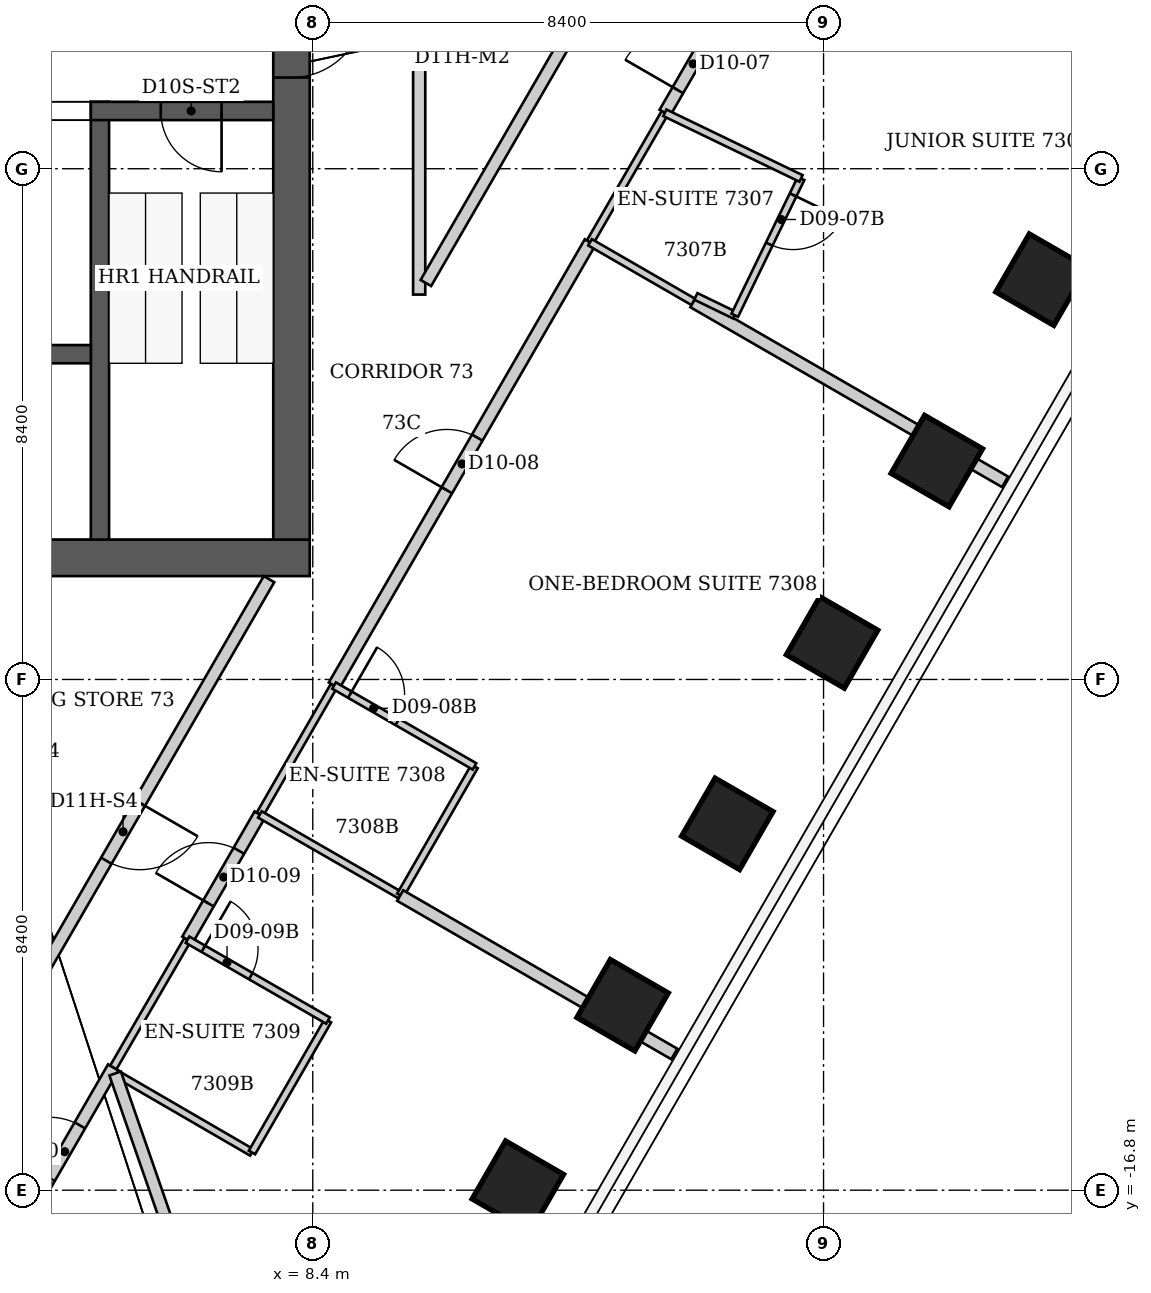
"""IFC4 building model, lengths in metres.
Left out: names, types, materials, properties, quantities, classifications, styles, units other than length and angle.
Written with IfcOpenShell. Run it as: python <this file> out.ifc"""

import sys

from ifc_helpers import new_model, si_unit, direction, frame, frame_2d, origin, origin_2d, place, context, subcontext, project, spatial, rectangle, extrude, element, fill, save


model = new_model("IFC4")
c1 = context("Model", 3, precision=1e-05, world=origin(), true_north=direction((0.0, 1.0)))
c2 = subcontext(c1, "Body", "Model", "MODEL_VIEW")
j1 = project(units=[si_unit("LENGTHUNIT", "METRE"), si_unit("PLANEANGLEUNIT", "RADIAN")], contexts=[c1])
p1 = place(None, origin())
s1 = spatial("IfcSite", under=j1, at=p1, CompositionType="ELEMENT")
p2 = place(p1, origin())
s2 = spatial("IfcBuilding", under=s1, at=p2, CompositionType="ELEMENT")
p3 = place(p2, frame((0.0, 0.0, 291.2)))
s3 = spatial("IfcBuildingStorey", under=s2, at=p3, CompositionType="ELEMENT", Elevation=291.2)
for number, where, z_axis, x_axis in (
    (1, (20.385, -1.824, 0.0), (0.0, 0.0, 1.0), (0.866, -0.5, 0.0)),
    (2, (18.663, -4.808, 0.0), (0.0, 0.0, 1.0), (0.866, -0.5, 0.0)),
    (3, (16.94, -7.792, 0.0), (0.0, 0.0, 1.0), (0.866, -0.5, 0.0)),
    (4, (15.218, -10.775, 0.0), (0.0, 0.0, 1.0), (0.866, -0.5, 0.0)),
    (5, (13.495, -13.759, 0.0), (0.0, 0.0, 1.0), (0.866, -0.5, 0.0)),
    (6, (11.773, -16.742, 0.0), (0.0, 0.0, 1.0), (0.866, -0.5, 0.0)),
):
    element("IfcColumn", number, at=place(p3, frame(where, z_axis=z_axis, x_axis=x_axis)), inside=s3, PredefinedType="COLUMN", context=c2, shape_type="SweptSolid", body=[
        extrude(rectangle(XDim=1.1, YDim=1.1, at=origin_2d()), origin(), (0.0, 0.0, 1.0), 3.8),
    ])
p4 = place(p3, frame((-8.35, -6.4, 0.0), z_axis=(0.0, 0.0, 1.0), x_axis=(1.0, 0.0, 0.0)))
e7 = element("IfcWall", 7, at=p4, inside=s3, PredefinedType="SHEAR", context=c2, shape_type="SweptSolid", body=[
    extrude(rectangle(XDim=16.7, YDim=0.6, at=frame_2d((8.35, 0.0))), origin(), (0.0, 0.0, 1.0), 3.8),
])
p5 = place(p3, frame((8.05, -6.1, 0.0), z_axis=(0.0, 0.0, 1.0), x_axis=(0.0, 1.0, 0.0)))
e8 = element("IfcWall", 8, at=p5, inside=s3, PredefinedType="SHEAR", context=c2, shape_type="SweptSolid", body=[
    extrude(rectangle(XDim=12.2, YDim=0.6, at=frame_2d((6.1, 0.0))), origin(), (0.0, 0.0, 1.0), 3.8),
])
p6 = place(p5, frame((7.6, 0.0, 0.0)))
e9 = element("IfcOpeningElement", 9, at=p6, cuts=e8, PredefinedType="OPENING", context=c2, shape_type="SweptSolid", body=[
    extrude(rectangle(XDim=1.2, YDim=2.2, at=frame_2d((0.6, 1.1))), frame((0.0, 0.3, 0.0), z_axis=(0.0, -1.0, 0.0), x_axis=(1.0, 0.0, 0.0)), (0.0, 0.0, 1.0), 0.6),
])
p7 = place(p3, frame((4.9, -6.1, 0.0), z_axis=(0.0, 0.0, 1.0), x_axis=(0.0, 1.0, 0.0)))
e10 = element("IfcWall", 10, at=p7, inside=s3, PredefinedType="SHEAR", context=c2, shape_type="SweptSolid", body=[
    extrude(rectangle(XDim=7.2, YDim=0.3, at=frame_2d((3.6, 0.0))), origin(), (0.0, 0.0, 1.0), 3.8),
])
p8 = place(p3, frame((4.75, 0.95, 0.0), z_axis=(0.0, 0.0, 1.0), x_axis=(1.0, 0.0, 0.0)))
e11 = element("IfcWall", 11, at=p8, inside=s3, PredefinedType="SHEAR", context=c2, shape_type="SweptSolid", body=[
    extrude(rectangle(XDim=3.0, YDim=0.3, at=frame_2d((1.5, 0.0))), origin(), (0.0, 0.0, 1.0), 3.8),
])
p9 = place(p8, frame((1.15, 0.0, 0.0)))
e12 = element("IfcOpeningElement", 12, at=p9, cuts=e11, PredefinedType="OPENING", context=c2, shape_type="SweptSolid", body=[
    extrude(rectangle(XDim=1.0, YDim=2.2, at=frame_2d((0.5, 1.1))), frame((0.0, 0.15, 0.0), z_axis=(0.0, -1.0, 0.0), x_axis=(1.0, 0.0, 0.0)), (0.0, 0.0, 1.0), 0.3),
])
p10 = place(p3, frame((1.65, -3.05, 0.0), z_axis=(0.0, 0.0, 1.0), x_axis=(1.0, 0.0, 0.0)))
e13 = element("IfcWall", 13, at=p10, inside=s3, PredefinedType="SHEAR", context=c2, shape_type="SweptSolid", body=[
    extrude(rectangle(XDim=3.1, YDim=0.3, at=frame_2d((1.55, 0.0))), origin(), (0.0, 0.0, 1.0), 3.8),
])
p11 = place(p10, frame((0.9, 0.0, 0.0)))
e14 = element("IfcOpeningElement", 14, at=p11, cuts=e13, PredefinedType="OPENING", context=c2, shape_type="SweptSolid", body=[
    extrude(rectangle(XDim=1.3, YDim=2.1, at=frame_2d((0.65, 1.05))), frame((0.0, 0.15, 0.0), z_axis=(0.0, -1.0, 0.0), x_axis=(1.0, 0.0, 0.0)), (0.0, 0.0, 1.0), 0.3),
])
p12 = place(p3, frame((3.92, -16.86, 0.0), z_axis=(0.0, 0.0, 1.0), x_axis=(0.499693115345, 0.866202511239, 0.0)))
e15 = element("IfcWall", 15, at=p12, inside=s3, PredefinedType="PARTITIONING", context=c2, shape_type="SweptSolid", body=[
    extrude(rectangle(XDim=2.401, YDim=0.2, at=frame_2d((1.201, 0.0))), origin(), (0.0, 0.0, 1.0), 3.64),
])
p13 = place(p12, frame((0.3, 0.0, 0.0)))
e16 = element("IfcOpeningElement", 16, at=p13, cuts=e15, PredefinedType="OPENING", context=c2, shape_type="SweptSolid", body=[
    extrude(rectangle(XDim=1.0, YDim=2.13, at=frame_2d((0.5, 1.065))), frame((0.0, 0.1, 0.0), z_axis=(0.0, -1.0, 0.0), x_axis=(1.0, 0.0, 0.0)), (0.0, 0.0, 1.0), 0.2),
])
p14 = place(p3, frame((5.12, -14.78, 0.0), z_axis=(0.0, 0.0, 1.0), x_axis=(0.502307685327, 0.86468895521, 0.0)))
e17 = element("IfcWall", 17, at=p14, inside=s3, PredefinedType="PARTITIONING", context=c2, shape_type="SweptSolid", body=[
    extrude(rectangle(XDim=2.429, YDim=0.12, at=frame_2d((1.214, 0.0))), origin(), (0.0, 0.0, 1.0), 3.64),
])
p15 = place(p3, frame((5.233, -14.923, 0.0), z_axis=(0.0, 0.0, 1.0), x_axis=(0.864900876675, -0.501942699445, 0.0)))
e18 = element("IfcWall", 18, at=p15, inside=s3, PredefinedType="PARTITIONING", context=c2, shape_type="SweptSolid", body=[
    extrude(rectangle(XDim=2.505, YDim=0.12, at=frame_2d((1.252, 0.0))), origin(), (0.0, 0.0, 1.0), 3.038),
])
p16 = place(p3, frame((6.34, -12.68, 0.0), z_axis=(0.0, 0.0, 1.0), x_axis=(0.500222880675, 0.865896685321, 0.0)))
e19 = element("IfcWall", 19, at=p16, inside=s3, PredefinedType="PARTITIONING", context=c2, shape_type="SweptSolid", body=[
    extrude(rectangle(XDim=2.379, YDim=0.2, at=frame_2d((1.189, 0.0))), origin(), (0.0, 0.0, 1.0), 3.64),
])
p17 = place(p16, frame((0.689, 0.0, 0.0)))
e20 = element("IfcOpeningElement", 20, at=p17, cuts=e19, PredefinedType="OPENING", context=c2, shape_type="SweptSolid", body=[
    extrude(rectangle(XDim=1.0, YDim=2.13, at=frame_2d((0.5, 1.065))), frame((0.0, 0.1, 0.0), z_axis=(0.0, -1.0, 0.0), x_axis=(1.0, 0.0, 0.0)), (0.0, 0.0, 1.0), 0.2),
])
p18 = place(p3, frame((7.4, -16.18, 0.0), z_axis=(0.0, 0.0, 1.0), x_axis=(0.499159685399, 0.866510016372, 0.0)))
e21 = element("IfcWall", 21, at=p18, inside=s3, PredefinedType="PARTITIONING", context=c2, shape_type="SweptSolid", body=[
    extrude(rectangle(XDim=2.504, YDim=0.12, at=frame_2d((1.252, 0.0))), origin(), (0.0, 0.0, 1.0), 3.64),
])
p19 = place(p3, frame((7.53, -10.62, 0.0), z_axis=(0.0, 0.0, 1.0), x_axis=(0.498748634132, 0.866746675766, 0.0)))
e22 = element("IfcWall", 22, at=p19, inside=s3, PredefinedType="PARTITIONING", context=c2, shape_type="SweptSolid", body=[
    extrude(rectangle(XDim=2.446, YDim=0.12, at=frame_2d((1.223, 0.0))), origin(), (0.0, 0.0, 1.0), 3.64),
])
p20 = place(p3, frame((7.53, -10.62, 0.0), z_axis=(0.0, 0.0, 1.0), x_axis=(0.866654860089, -0.498908161372, 0.0)))
e23 = element("IfcWall", 23, at=p20, inside=s3, PredefinedType="PARTITIONING", context=c2, shape_type="SweptSolid", body=[
    extrude(rectangle(XDim=2.666, YDim=0.12, at=frame_2d((1.333, 0.0))), origin(), (0.0, 0.0, 1.0), 3.64),
])
p21 = place(p3, frame((7.68, -6.75, 0.0), z_axis=(0.0, 0.0, 1.0), x_axis=(-0.500174600737, -0.865924574532, 0.0)))
e24 = element("IfcWall", 24, at=p21, inside=s3, PredefinedType="PARTITIONING", context=c2, shape_type="SweptSolid", body=[
    extrude(rectangle(XDim=9.597, YDim=0.2, at=frame_2d((4.798, 0.0))), origin(), (0.0, 0.0, 1.0), 3.64),
])
p22 = place(p21, frame((4.248, 0.0, 0.0)))
e25 = element("IfcOpeningElement", 25, at=p22, cuts=e24, PredefinedType="OPENING", context=c2, shape_type="SweptSolid", body=[
    extrude(rectangle(XDim=1.1, YDim=2.2, at=frame_2d((0.55, 1.1))), frame((0.0, 0.1, 0.0), z_axis=(0.0, -1.0, 0.0), x_axis=(1.0, 0.0, 0.0)), (0.0, 0.0, 1.0), 0.2),
])
p23 = place(p3, frame((8.45, -24.382, 0.0), z_axis=(0.0, 0.0, 1.0), x_axis=(-0.328108256954, 0.944640128154, 0.0)))
e26 = element("IfcWall", 26, at=p23, inside=s3, PredefinedType="PARTITIONING", context=c2, shape_type="SweptSolid", body=[
    extrude(rectangle(XDim=10.059, YDim=0.2, at=frame_2d((5.029, 0.0))), origin(), (0.0, 0.0, 1.0), 3.64),
])
p24 = place(p3, frame((8.65, -14.01, 0.0), z_axis=(0.0, 0.0, 1.0), x_axis=(-0.866592449628, 0.499016559092, 0.0)))
e27 = element("IfcWall", 27, at=p24, inside=s3, PredefinedType="PARTITIONING", context=c2, shape_type="SweptSolid", body=[
    extrude(rectangle(XDim=2.665, YDim=0.12, at=frame_2d((1.333, 0.0))), origin(), (0.0, 0.0, 1.0), 3.64),
])
p25 = place(p24, frame((1.466, 0.0, 0.0)))
e28 = element("IfcOpeningElement", 28, at=p25, cuts=e27, PredefinedType="OPENING", context=c2, shape_type="SweptSolid", body=[
    extrude(rectangle(XDim=0.9, YDim=2.03, at=frame_2d((0.45, 1.015))), frame((0.0, 0.06, 0.0), z_axis=(0.0, -1.0, 0.0), x_axis=(1.0, 0.0, 0.0)), (0.0, 0.0, 1.0), 0.12),
])
p26 = place(p3, frame((8.75, -8.5, 0.0), z_axis=(0.0, 0.0, 1.0), x_axis=(0.500093981358, 0.865971136822, 0.0)))
e29 = element("IfcWall", 29, at=p26, inside=s3, PredefinedType="PARTITIONING", context=c2, shape_type="SweptSolid", body=[
    extrude(rectangle(XDim=8.418, YDim=0.2, at=frame_2d((4.209, 0.0))), origin(), (0.0, 0.0, 1.0), 3.64),
])
p27 = place(p26, frame((3.709, 0.0, 0.0)))
e30 = element("IfcOpeningElement", 30, at=p27, cuts=e29, PredefinedType="OPENING", context=c2, shape_type="SweptSolid", body=[
    extrude(rectangle(XDim=1.0, YDim=2.13, at=frame_2d((0.5, 1.065))), frame((0.0, 0.1, 0.0), z_axis=(0.0, -1.0, 0.0), x_axis=(1.0, 0.0, 0.0)), (0.0, 0.0, 1.0), 0.2),
])
p28 = place(p3, frame((9.84, -11.95, 0.0), z_axis=(0.0, 0.0, 1.0), x_axis=(0.498791783817, 0.866721844883, 0.0)))
e31 = element("IfcWall", 31, at=p28, inside=s3, PredefinedType="PARTITIONING", context=c2, shape_type="SweptSolid", body=[
    extrude(rectangle(XDim=2.446, YDim=0.12, at=frame_2d((1.223, 0.0))), origin(), (0.0, 0.0, 1.0), 3.64),
])
p29 = place(p3, frame((10.15, -2.07, 0.0), z_axis=(0.0, 0.0, 1.0), x_axis=(0.0, 1.0, 0.0)))
e32 = element("IfcWall", 32, at=p29, inside=s3, PredefinedType="PARTITIONING", context=c2, shape_type="SweptSolid", body=[
    extrude(rectangle(XDim=9.21, YDim=0.2, at=frame_2d((4.605, 0.0))), origin(), (0.0, 0.0, 1.0), 3.64),
])
p30 = place(p29, frame((4.055, 0.0, 0.0)))
e33 = element("IfcOpeningElement", 33, at=p30, cuts=e32, PredefinedType="OPENING", context=c2, shape_type="SweptSolid", body=[
    extrude(rectangle(XDim=1.1, YDim=2.2, at=frame_2d((0.55, 1.1))), frame((0.0, 0.1, 0.0), z_axis=(0.0, -1.0, 0.0), x_axis=(1.0, 0.0, 0.0)), (0.0, 0.0, 1.0), 0.2),
])
p31 = place(p3, frame((11.06, -9.83, 0.0), z_axis=(0.0, 0.0, 1.0), x_axis=(-0.866615255992, 0.498976951453, 0.0)))
e34 = element("IfcWall", 34, at=p31, inside=s3, PredefinedType="PARTITIONING", context=c2, shape_type="SweptSolid", body=[
    extrude(rectangle(XDim=2.666, YDim=0.12, at=frame_2d((1.333, 0.0))), origin(), (0.0, 0.0, 1.0), 3.64),
])
p32 = place(p31, frame((1.466, 0.0, 0.0)))
e35 = element("IfcOpeningElement", 35, at=p32, cuts=e34, PredefinedType="OPENING", context=c2, shape_type="SweptSolid", body=[
    extrude(rectangle(XDim=0.9, YDim=2.03, at=frame_2d((0.45, 1.015))), frame((0.0, 0.06, 0.0), z_axis=(0.0, -1.0, 0.0), x_axis=(1.0, 0.0, 0.0)), (0.0, 0.0, 1.0), 0.12),
])
p33 = place(p3, frame((12.81, 2.53, 0.0), z_axis=(0.0, 0.0, 1.0), x_axis=(-0.500571425319, -0.865695239766, 0.0)))
e36 = element("IfcWall", 36, at=p33, inside=s3, PredefinedType="PARTITIONING", context=c2, shape_type="SweptSolid", body=[
    extrude(rectangle(XDim=5.094, YDim=0.2, at=frame_2d((2.547, 0.0))), origin(), (0.0, 0.0, 1.0), 3.64),
])
p34 = place(p3, frame((12.959, -1.209, 0.0), z_axis=(0.0, 0.0, 1.0), x_axis=(0.500472725713, 0.865752303385, 0.0)))
e37 = element("IfcWall", 37, at=p34, inside=s3, PredefinedType="PARTITIONING", context=c2, shape_type="SweptSolid", body=[
    extrude(rectangle(XDim=2.459, YDim=0.12, at=frame_2d((1.23, 0.0))), origin(), (0.0, 0.0, 1.0), 3.64),
])
p35 = place(p3, frame((12.96, -1.21, 0.0), z_axis=(0.0, 0.0, 1.0), x_axis=(0.866075784294, -0.499912728242, 0.0)))
e38 = element("IfcWall", 38, at=p35, inside=s3, PredefinedType="PARTITIONING", context=c2, shape_type="SweptSolid", body=[
    extrude(rectangle(XDim=1.962, YDim=0.12, at=frame_2d((0.981, 0.0))), origin(), (0.0, 0.0, 1.0), 3.64),
])
p36 = place(p3, frame((14.19, 0.92, 0.0), z_axis=(0.0, 0.0, 1.0), x_axis=(0.500233848448, 0.865890349217, 0.0)))
e39 = element("IfcWall", 39, at=p36, inside=s3, PredefinedType="PARTITIONING", context=c2, shape_type="SweptSolid", body=[
    extrude(rectangle(XDim=1.859, YDim=0.2, at=frame_2d((0.93, 0.0))), origin(), (0.0, 0.0, 1.0), 3.64),
])
p37 = place(p36, frame((0.43, 0.0, 0.0)))
e40 = element("IfcOpeningElement", 40, at=p37, cuts=e39, PredefinedType="OPENING", context=c2, shape_type="SweptSolid", body=[
    extrude(rectangle(XDim=1.0, YDim=2.13, at=frame_2d((0.5, 1.065))), frame((0.0, 0.1, 0.0), z_axis=(0.0, -1.0, 0.0), x_axis=(1.0, 0.0, 0.0)), (0.0, 0.0, 1.0), 0.2),
])
p38 = place(p3, frame((14.346, -14.56, 0.0), z_axis=(0.0, 0.0, 1.0), x_axis=(-0.86575990496, 0.500459575754, 0.0)))
e41 = element("IfcWall", 41, at=p38, inside=s3, PredefinedType="PARTITIONING", context=c2, shape_type="SweptSolid", body=[
    extrude(rectangle(XDim=5.208, YDim=0.2, at=frame_2d((2.604, 0.0))), origin(), (0.0, 0.0, 1.0), 3.64),
])
p39 = place(p3, frame((14.659, -2.191, 0.0), z_axis=(0.0, 0.0, 1.0), x_axis=(0.866075017274, -0.499914057068, 0.0)))
e42 = element("IfcWall", 42, at=p39, inside=s3, PredefinedType="PARTITIONING", context=c2, shape_type="SweptSolid", body=[
    extrude(rectangle(XDim=5.919, YDim=0.2, at=frame_2d((2.96, 0.0))), origin(), (0.0, 0.0, 1.0), 3.64),
])
p40 = place(p3, frame((14.7, -2.1, 0.0), z_axis=(0.0, 0.0, 1.0), x_axis=(0.900120171182, -0.43564168468, 0.0)))
e43 = element("IfcWall", 43, at=p40, inside=s3, PredefinedType="PARTITIONING", context=c2, shape_type="SweptSolid", body=[
    extrude(rectangle(XDim=0.711, YDim=0.12, at=frame_2d((0.355, 0.0))), origin(), (0.0, 0.0, 1.0), 3.64),
])
p41 = place(p3, frame((15.34, -2.41, 0.0), z_axis=(0.0, 0.0, 1.0), x_axis=(0.435928453727, 0.899981323824, 0.0)))
e44 = element("IfcWall", 44, at=p41, inside=s3, PredefinedType="PARTITIONING", context=c2, shape_type="SweptSolid", body=[
    extrude(rectangle(XDim=2.5, YDim=0.12, at=frame_2d((1.25, 0.0))), origin(), (0.0, 0.0, 1.0), 3.64),
])
p42 = place(p41, frame((1.3, 0.0, 0.0)))
e45 = element("IfcOpeningElement", 45, at=p42, cuts=e44, PredefinedType="OPENING", context=c2, shape_type="SweptSolid", body=[
    extrude(rectangle(XDim=0.9, YDim=2.03, at=frame_2d((0.45, 1.015))), frame((0.0, 0.06, 0.0), z_axis=(0.0, -1.0, 0.0), x_axis=(1.0, 0.0, 0.0)), (0.0, 0.0, 1.0), 0.12),
])
p43 = place(p3, frame((16.43, -0.16, 0.0), z_axis=(0.0, 0.0, 1.0), x_axis=(-0.900794056548, 0.434246551729, 0.0)))
e46 = element("IfcWall", 46, at=p43, inside=s3, PredefinedType="PARTITIONING", context=c2, shape_type="SweptSolid", body=[
    extrude(rectangle(XDim=2.487, YDim=0.12, at=frame_2d((1.243, 0.0))), origin(), (0.0, 0.0, 1.0), 3.64),
])
p44 = place(p37, origin())
e47 = element("IfcDoor", 47, at=p44, inside=s3, OperationType="SINGLE_SWING_LEFT", PredefinedType="DOOR", context=c2, shape_type="SweptSolid", body=[
    extrude(rectangle(XDim=1.0, YDim=2.13, at=frame_2d((0.5, 1.065))), frame((0.0, 0.025, 0.0), z_axis=(0.0, -1.0, 0.0), x_axis=(1.0, 0.0, 0.0)), (0.0, 0.0, 1.0), 0.05),
])
fill(e40, e47)
p45 = place(p42, origin())
e48 = element("IfcDoor", 48, at=p45, inside=s3, OperationType="SINGLE_SWING_RIGHT", PredefinedType="DOOR", context=c2, shape_type="SweptSolid", body=[
    extrude(rectangle(XDim=0.9, YDim=2.03, at=frame_2d((0.45, 1.015))), frame((0.0, 0.025, 0.0), z_axis=(0.0, -1.0, 0.0), x_axis=(1.0, 0.0, 0.0)), (0.0, 0.0, 1.0), 0.05),
])
fill(e45, e48)
p46 = place(p27, origin())
e49 = element("IfcDoor", 49, at=p46, inside=s3, OperationType="SINGLE_SWING_LEFT", PredefinedType="DOOR", context=c2, shape_type="SweptSolid", body=[
    extrude(rectangle(XDim=1.0, YDim=2.13, at=frame_2d((0.5, 1.065))), frame((0.0, 0.025, 0.0), z_axis=(0.0, -1.0, 0.0), x_axis=(1.0, 0.0, 0.0)), (0.0, 0.0, 1.0), 0.05),
])
fill(e30, e49)
p47 = place(p32, origin())
e50 = element("IfcDoor", 50, at=p47, inside=s3, OperationType="SINGLE_SWING_RIGHT", PredefinedType="DOOR", context=c2, shape_type="SweptSolid", body=[
    extrude(rectangle(XDim=0.9, YDim=2.03, at=frame_2d((0.45, 1.015))), frame((0.0, 0.025, 0.0), z_axis=(0.0, -1.0, 0.0), x_axis=(1.0, 0.0, 0.0)), (0.0, 0.0, 1.0), 0.05),
])
fill(e35, e50)
p48 = place(p17, origin())
e51 = element("IfcDoor", 51, at=p48, inside=s3, OperationType="SINGLE_SWING_LEFT", PredefinedType="DOOR", context=c2, shape_type="SweptSolid", body=[
    extrude(rectangle(XDim=1.0, YDim=2.13, at=frame_2d((0.5, 1.065))), frame((0.0, 0.025, 0.0), z_axis=(0.0, -1.0, 0.0), x_axis=(1.0, 0.0, 0.0)), (0.0, 0.0, 1.0), 0.05),
])
fill(e20, e51)
p49 = place(p25, origin())
e52 = element("IfcDoor", 52, at=p49, inside=s3, OperationType="SINGLE_SWING_RIGHT", PredefinedType="DOOR", context=c2, shape_type="SweptSolid", body=[
    extrude(rectangle(XDim=0.9, YDim=2.03, at=frame_2d((0.45, 1.015))), frame((0.0, 0.025, 0.0), z_axis=(0.0, -1.0, 0.0), x_axis=(1.0, 0.0, 0.0)), (0.0, 0.0, 1.0), 0.05),
])
fill(e28, e52)
p50 = place(p13, origin())
e53 = element("IfcDoor", 53, at=p50, inside=s3, OperationType="SINGLE_SWING_LEFT", PredefinedType="DOOR", context=c2, shape_type="SweptSolid", body=[
    extrude(rectangle(XDim=1.0, YDim=2.13, at=frame_2d((0.5, 1.065))), frame((0.0, 0.025, 0.0), z_axis=(0.0, -1.0, 0.0), x_axis=(1.0, 0.0, 0.0)), (0.0, 0.0, 1.0), 0.05),
])
fill(e16, e53)
p51 = place(p22, origin())
e54 = element("IfcDoor", 54, at=p51, inside=s3, OperationType="SINGLE_SWING_LEFT", PredefinedType="DOOR", context=c2, shape_type="SweptSolid", body=[
    extrude(rectangle(XDim=1.1, YDim=2.2, at=frame_2d((0.55, 1.1))), frame((0.0, 0.025, 0.0), z_axis=(0.0, -1.0, 0.0), x_axis=(1.0, 0.0, 0.0)), (0.0, 0.0, 1.0), 0.05),
])
fill(e25, e54)
p52 = place(p9, origin())
e55 = element("IfcDoor", 55, at=p52, inside=s3, OperationType="SINGLE_SWING_RIGHT", PredefinedType="DOOR", context=c2, shape_type="SweptSolid", body=[
    extrude(rectangle(XDim=1.0, YDim=2.2, at=frame_2d((0.5, 1.1))), frame((0.0, 0.025, 0.0), z_axis=(0.0, -1.0, 0.0), x_axis=(1.0, 0.0, 0.0)), (0.0, 0.0, 1.0), 0.05),
])
fill(e12, e55)
p53 = place(p6, origin())
e56 = element("IfcDoor", 56, at=p53, inside=s3, OperationType="SINGLE_SWING_RIGHT", PredefinedType="DOOR", context=c2, shape_type="SweptSolid", body=[
    extrude(rectangle(XDim=1.2, YDim=2.2, at=frame_2d((0.6, 1.1))), frame((0.0, 0.025, 0.0), z_axis=(0.0, -1.0, 0.0), x_axis=(1.0, 0.0, 0.0)), (0.0, 0.0, 1.0), 0.05),
])
fill(e9, e56)
save(model, sys.argv[1])
